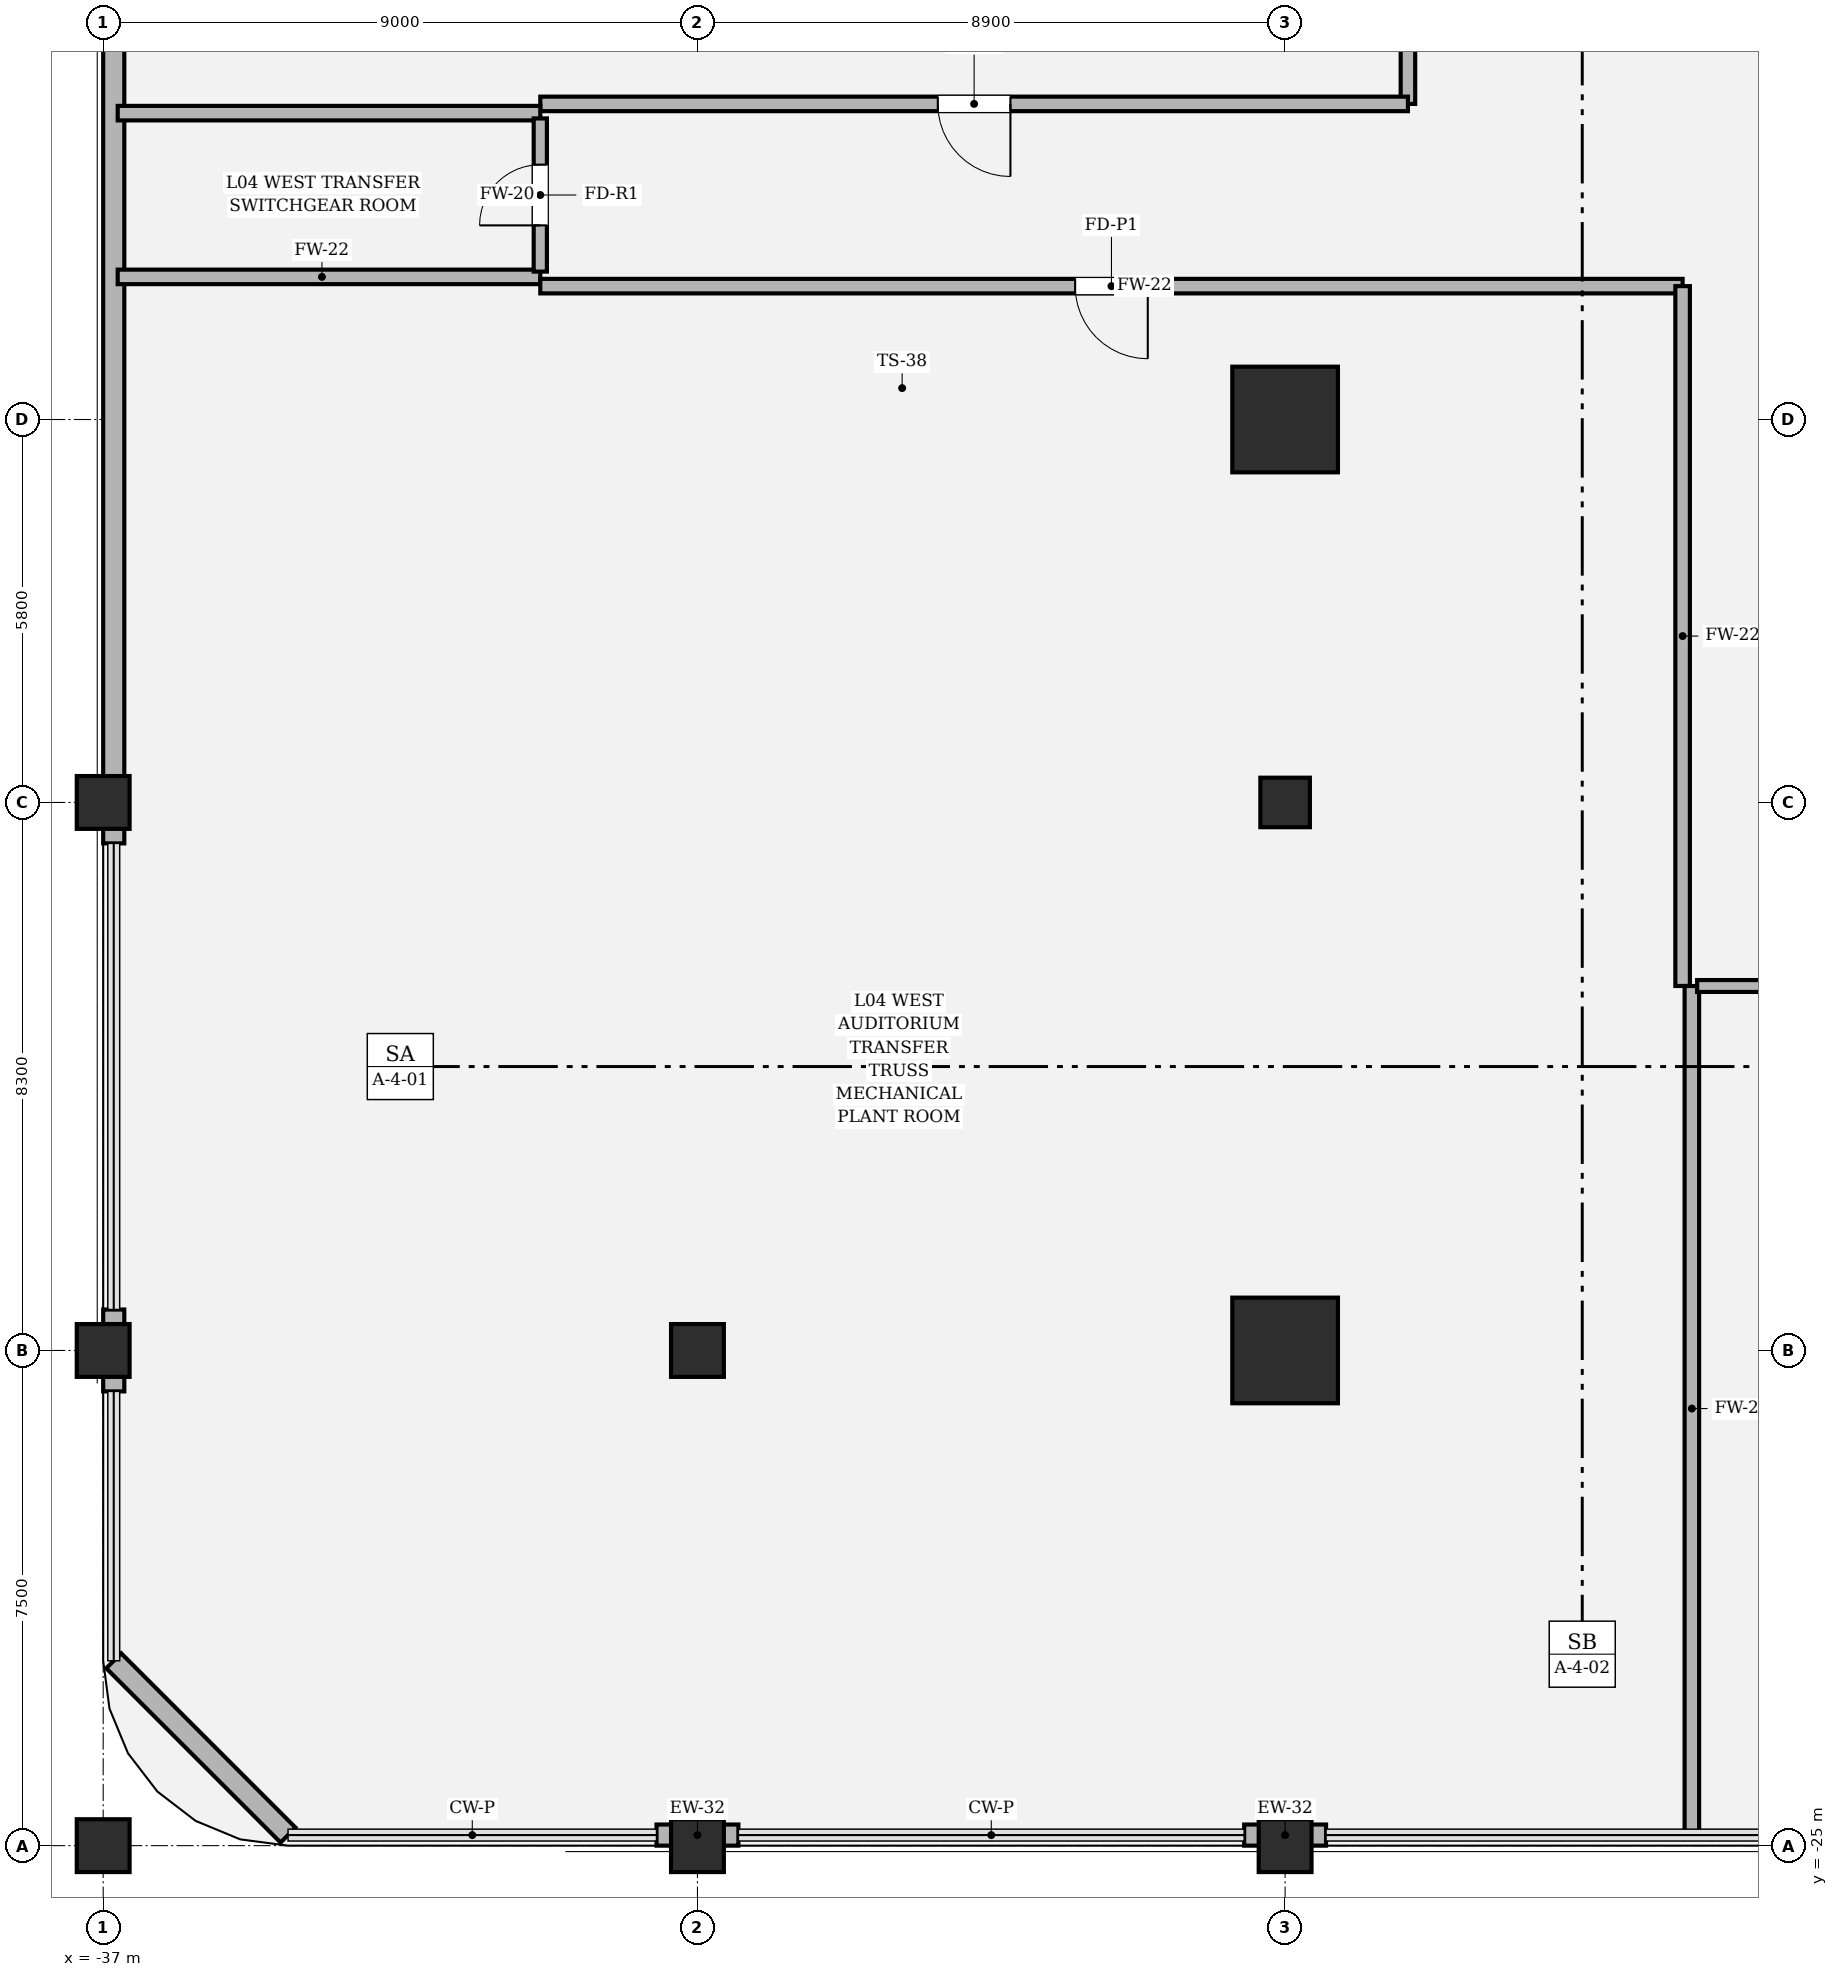
"""IFC4 building model, lengths in metres.
Left out: names, types, materials, properties, quantities, classifications, styles, units other than length and angle.
Written with IfcOpenShell. Run it as: python <this file> out.ifc"""

import sys

from ifc_helpers import new_model, si_unit, direction, frame, frame_2d, origin, origin_2d, place, context, subcontext, project, spatial, rectangle, hollow_rectangle, circle, extrude, element, fill, save


model = new_model("IFC4")
c1 = context("Model", 3, precision=1e-05, world=origin(), true_north=direction((0.0, 1.0)))
c2 = subcontext(c1, "Body", "Model", "MODEL_VIEW")
j1 = project(units=[si_unit("LENGTHUNIT", "METRE"), si_unit("PLANEANGLEUNIT", "RADIAN")], contexts=[c1])
p1 = place(None, origin())
s1 = spatial("IfcSite", under=j1, at=p1, CompositionType="ELEMENT")
p2 = place(p1, origin())
s2 = spatial("IfcBuilding", under=s1, at=p2, CompositionType="ELEMENT")
p3 = place(p2, frame((0.0, 0.0, 22.2)))
s3 = spatial("IfcBuildingStorey", under=s2, at=p3, CompositionType="ELEMENT", Elevation=22.2)
for number, where, z_axis, x_axis in (
    (1, (-19.1, -17.5, 0.0), (0.0, 0.0, 1.0), (1.0, 0.0, 0.0)),
    (2, (-19.1, -3.4, 0.0), (0.0, 0.0, 1.0), (1.0, 0.0, 0.0)),
):
    element("IfcColumn", number, at=place(p3, frame(where, z_axis=z_axis, x_axis=x_axis)), inside=s3, PredefinedType="COLUMN", context=c2, shape_type="SweptSolid", body=[
        extrude(hollow_rectangle(XDim=1.6, YDim=1.6, WallThickness=0.05, at=origin_2d()), origin(), (0.0, 0.0, 1.0), 6.0),
    ])
for number, where, z_axis, x_axis in (
    (3, (-37.0, -25.0, 0.0), (0.0, 0.0, 1.0), (1.0, 0.0, 0.0)),
    (4, (-28.0, -25.0, 0.0), (0.0, 0.0, 1.0), (1.0, 0.0, 0.0)),
    (5, (-19.1, -25.0, 0.0), (0.0, 0.0, 1.0), (1.0, 0.0, 0.0)),
    (6, (-37.0, -17.5, 0.0), (0.0, 0.0, 1.0), (1.0, 0.0, 0.0)),
    (7, (-28.0, -17.5, 0.0), (0.0, 0.0, 1.0), (1.0, 0.0, 0.0)),
    (8, (-37.0, -9.2, 0.0), (0.0, 0.0, 1.0), (1.0, 0.0, 0.0)),
):
    element("IfcColumn", number, at=place(p3, frame(where, z_axis=z_axis, x_axis=x_axis)), inside=s3, PredefinedType="COLUMN", context=c2, shape_type="SweptSolid", body=[
        extrude(rectangle(XDim=0.8, YDim=0.8, at=origin_2d()), origin(), (0.0, 0.0, 1.0), 6.0),
    ])
p4 = place(p3, frame((-19.1, -9.2, 0.0), z_axis=(0.0, 0.0, 1.0), x_axis=(1.0, 0.0, 0.0)))
e9 = element("IfcColumn", 9, at=p4, inside=s3, PredefinedType="PILASTER", context=c2, shape_type="SweptSolid", body=[
    extrude(circle(Radius=0.375, at=origin_2d()), origin(), (0.0, 0.0, 1.0), 6.0),
])
p5 = place(p3, frame((-28.62, -24.84, 0.0), z_axis=(0.0, 0.0, 1.0), x_axis=(1.0, 0.0, 0.0)))
e10 = element("IfcWall", 10, at=p5, inside=s3, PredefinedType="SOLIDWALL", context=c2, shape_type="SweptSolid", body=[
    extrude(rectangle(XDim=1.24, YDim=0.32, at=frame_2d((0.62, 0.0))), origin(), (0.0, 0.0, 1.0), 3.864),
])
p6 = place(p3, frame((-19.72, -24.84, 0.0), z_axis=(0.0, 0.0, 1.0), x_axis=(1.0, 0.0, 0.0)))
e11 = element("IfcWall", 11, at=p6, inside=s3, PredefinedType="SOLIDWALL", context=c2, shape_type="SweptSolid", body=[
    extrude(rectangle(XDim=1.24, YDim=0.32, at=frame_2d((0.62, 0.0))), origin(), (0.0, 0.0, 1.0), 3.864),
])
p7 = place(p3, frame((-36.84, -9.82, 0.0), z_axis=(0.0, 0.0, 1.0), x_axis=(0.0, 1.0, 0.0)))
e12 = element("IfcWall", 12, at=p7, inside=s3, PredefinedType="SOLIDWALL", context=c2, shape_type="SweptSolid", body=[
    extrude(rectangle(XDim=19.64, YDim=0.32, at=frame_2d((9.82, 0.0))), origin(), (0.0, 0.0, 1.0), 3.864),
])
p8 = place(p3, frame((-36.84, -18.12, 0.0), z_axis=(0.0, 0.0, 1.0), x_axis=(0.0, 1.0, 0.0)))
e13 = element("IfcWall", 13, at=p8, inside=s3, PredefinedType="SOLIDWALL", context=c2, shape_type="SweptSolid", body=[
    extrude(rectangle(XDim=1.24, YDim=0.32, at=frame_2d((0.62, 0.0))), origin(), (0.0, 0.0, 1.0), 3.864),
])
p9 = place(p3, frame((-34.2, -24.84, 0.0), z_axis=(0.0, 0.0, 1.0), x_axis=(-0.707106781187, 0.707106781187, 0.0)))
e14 = element("IfcWall", 14, at=p9, inside=s3, PredefinedType="SOLIDWALL", context=c2, shape_type="SweptSolid", body=[
    extrude(rectangle(XDim=3.734, YDim=0.32, at=frame_2d((1.867, 0.0))), origin(), (0.0, 0.0, 1.0), 3.864),
])
p10 = place(p3, frame((-36.78, -1.24, 0.0), z_axis=(0.0, 0.0, 1.0), x_axis=(1.0, 0.0, 0.0)))
e15 = element("IfcWall", 15, at=p10, inside=s3, PredefinedType="SOLIDWALL", context=c2, shape_type="SweptSolid", body=[
    extrude(rectangle(XDim=6.4, YDim=0.22, at=frame_2d((3.2, 0.0))), origin(), (0.0, 0.0, 1.0), 5.72),
])
p11 = place(p3, frame((-30.38, -1.38, 0.0), z_axis=(0.0, 0.0, 1.0), x_axis=(1.0, 0.0, 0.0)))
e16 = element("IfcWall", 16, at=p11, inside=s3, PredefinedType="SOLIDWALL", context=c2, shape_type="SweptSolid", body=[
    extrude(rectangle(XDim=17.3, YDim=0.22, at=frame_2d((8.65, 0.0))), origin(), (0.0, 0.0, 1.0), 4.394),
])
p12 = place(p11, frame((8.1, 0.0, 0.0)))
e17 = element("IfcOpeningElement", 17, at=p12, cuts=e16, PredefinedType="OPENING", context=c2, shape_type="SweptSolid", body=[
    extrude(rectangle(XDim=1.1, YDim=2.2, at=frame_2d((0.55, 1.1))), frame((0.0, 0.12, 0.0), z_axis=(0.0, -1.0, 0.0), x_axis=(1.0, 0.0, 0.0)), (0.0, 0.0, 1.0), 0.24),
])
p13 = place(p3, frame((-13.08, -1.38, 0.0), z_axis=(0.0, 0.0, 1.0), x_axis=(0.0, -1.0, 0.0)))
e18 = element("IfcWall", 18, at=p13, inside=s3, PredefinedType="SOLIDWALL", context=c2, shape_type="SweptSolid", body=[
    extrude(rectangle(XDim=10.6, YDim=0.22, at=frame_2d((5.3, 0.0))), origin(), (0.0, 0.0, 1.0), 4.394),
])
p14 = place(p3, frame((-12.94, -11.98, 0.0), z_axis=(0.0, 0.0, 1.0), x_axis=(0.0, -1.0, 0.0)))
e19 = element("IfcWall", 19, at=p14, inside=s3, PredefinedType="SOLIDWALL", context=c2, shape_type="SweptSolid", body=[
    extrude(rectangle(XDim=12.8, YDim=0.22, at=frame_2d((6.4, 0.0))), origin(), (0.0, 0.0, 1.0), 4.394),
])
p15 = place(p3, frame((-17.24, 11.62, 0.0), z_axis=(0.0, 0.0, 1.0), x_axis=(0.0, -1.0, 0.0)))
e20 = element("IfcWall", 20, at=p15, inside=s3, PredefinedType="SOLIDWALL", context=c2, shape_type="SweptSolid", body=[
    extrude(rectangle(XDim=10.24, YDim=0.22, at=frame_2d((5.12, 0.0))), origin(), (0.0, 0.0, 1.0), 4.394),
])
p16 = place(p3, frame((-17.24, 1.38, 0.0), z_axis=(0.0, 0.0, 1.0), x_axis=(-1.0, 0.0, 0.0)))
e21 = element("IfcWall", 21, at=p16, inside=s3, PredefinedType="SOLIDWALL", context=c2, shape_type="SweptSolid", body=[
    extrude(rectangle(XDim=13.14, YDim=0.22, at=frame_2d((6.57, 0.0))), origin(), (0.0, 0.0, 1.0), 4.394),
])
p17 = place(p16, frame((6.02, 0.0, 0.0)))
e22 = element("IfcOpeningElement", 22, at=p17, cuts=e21, PredefinedType="OPENING", context=c2, shape_type="SweptSolid", body=[
    extrude(rectangle(XDim=1.1, YDim=2.2, at=frame_2d((0.55, 1.1))), frame((0.0, 0.12, 0.0), z_axis=(0.0, -1.0, 0.0), x_axis=(1.0, 0.0, 0.0)), (0.0, 0.0, 1.0), 0.24),
])
p18 = place(p3, frame((-30.38, 1.24, 0.0), z_axis=(0.0, 0.0, 1.0), x_axis=(-1.0, 0.0, 0.0)))
e23 = element("IfcWall", 23, at=p18, inside=s3, PredefinedType="SOLIDWALL", context=c2, shape_type="SweptSolid", body=[
    extrude(rectangle(XDim=6.4, YDim=0.22, at=frame_2d((3.2, 0.0))), origin(), (0.0, 0.0, 1.0), 5.72),
])
p19 = place(p3, frame((-30.38, 1.16, 0.0), z_axis=(0.0, 0.0, 1.0), x_axis=(0.0, -1.0, 0.0)))
e24 = element("IfcWall", 24, at=p19, inside=s3, PredefinedType="SOLIDWALL", context=c2, shape_type="SweptSolid", body=[
    extrude(rectangle(XDim=2.32, YDim=0.2, at=frame_2d((1.16, 0.0))), origin(), (0.0, 0.0, 1.0), 5.72),
])
p20 = place(p19, frame((0.7, 0.0, 0.0)))
e25 = element("IfcOpeningElement", 25, at=p20, cuts=e24, PredefinedType="OPENING", context=c2, shape_type="SweptSolid", body=[
    extrude(rectangle(XDim=0.92, YDim=2.1, at=frame_2d((0.46, 1.05))), frame((0.0, 0.11, 0.0), z_axis=(0.0, -1.0, 0.0), x_axis=(1.0, 0.0, 0.0)), (0.0, 0.0, 1.0), 0.22),
])
p21 = place(p3, frame((-12.86, -11.98, 0.0), z_axis=(0.0, 0.0, 1.0), x_axis=(1.0, 0.0, 0.0)))
e26 = element("IfcWall", 26, at=p21, inside=s3, PredefinedType="PARTITIONING", context=c2, shape_type="SweptSolid", body=[
    extrude(rectangle(XDim=25.72, YDim=0.18, at=frame_2d((12.86, 0.0))), origin(), (0.0, 0.0, 1.0), 4.394),
])
p22 = place(p21, frame((12.335, 0.0, 0.0)))
e27 = element("IfcOpeningElement", 27, at=p22, cuts=e26, PredefinedType="OPENING", context=c2, shape_type="SweptSolid", body=[
    extrude(rectangle(XDim=1.05, YDim=2.2, at=frame_2d((0.525, 1.1))), frame((0.0, 0.1, 0.0), z_axis=(0.0, -1.0, 0.0), x_axis=(1.0, 0.0, 0.0)), (0.0, 0.0, 1.0), 0.2),
])
p23 = place(p12, origin())
e28 = element("IfcDoor", 28, at=p23, inside=s3, OperationType="SINGLE_SWING_RIGHT", PredefinedType="DOOR", context=c2, shape_type="SweptSolid", body=[
    extrude(rectangle(XDim=1.1, YDim=2.2, at=frame_2d((0.55, 1.1))), frame((0.0, 0.025, 0.0), z_axis=(0.0, -1.0, 0.0), x_axis=(1.0, 0.0, 0.0)), (0.0, 0.0, 1.0), 0.05),
])
fill(e17, e28)
p24 = place(p17, origin())
e29 = element("IfcDoor", 29, at=p24, inside=s3, OperationType="SINGLE_SWING_LEFT", PredefinedType="DOOR", context=c2, shape_type="SweptSolid", body=[
    extrude(rectangle(XDim=1.1, YDim=2.2, at=frame_2d((0.55, 1.1))), frame((0.0, 0.025, 0.0), z_axis=(0.0, -1.0, 0.0), x_axis=(1.0, 0.0, 0.0)), (0.0, 0.0, 1.0), 0.05),
])
fill(e22, e29)
p25 = place(p20, origin())
e30 = element("IfcDoor", 30, at=p25, inside=s3, OperationType="SINGLE_SWING_RIGHT", PredefinedType="DOOR", context=c2, shape_type="SweptSolid", body=[
    extrude(rectangle(XDim=0.92, YDim=2.1, at=frame_2d((0.46, 1.05))), frame((0.0, 0.025, 0.0), z_axis=(0.0, -1.0, 0.0), x_axis=(1.0, 0.0, 0.0)), (0.0, 0.0, 1.0), 0.05),
])
fill(e25, e30)
save(model, sys.argv[1])
